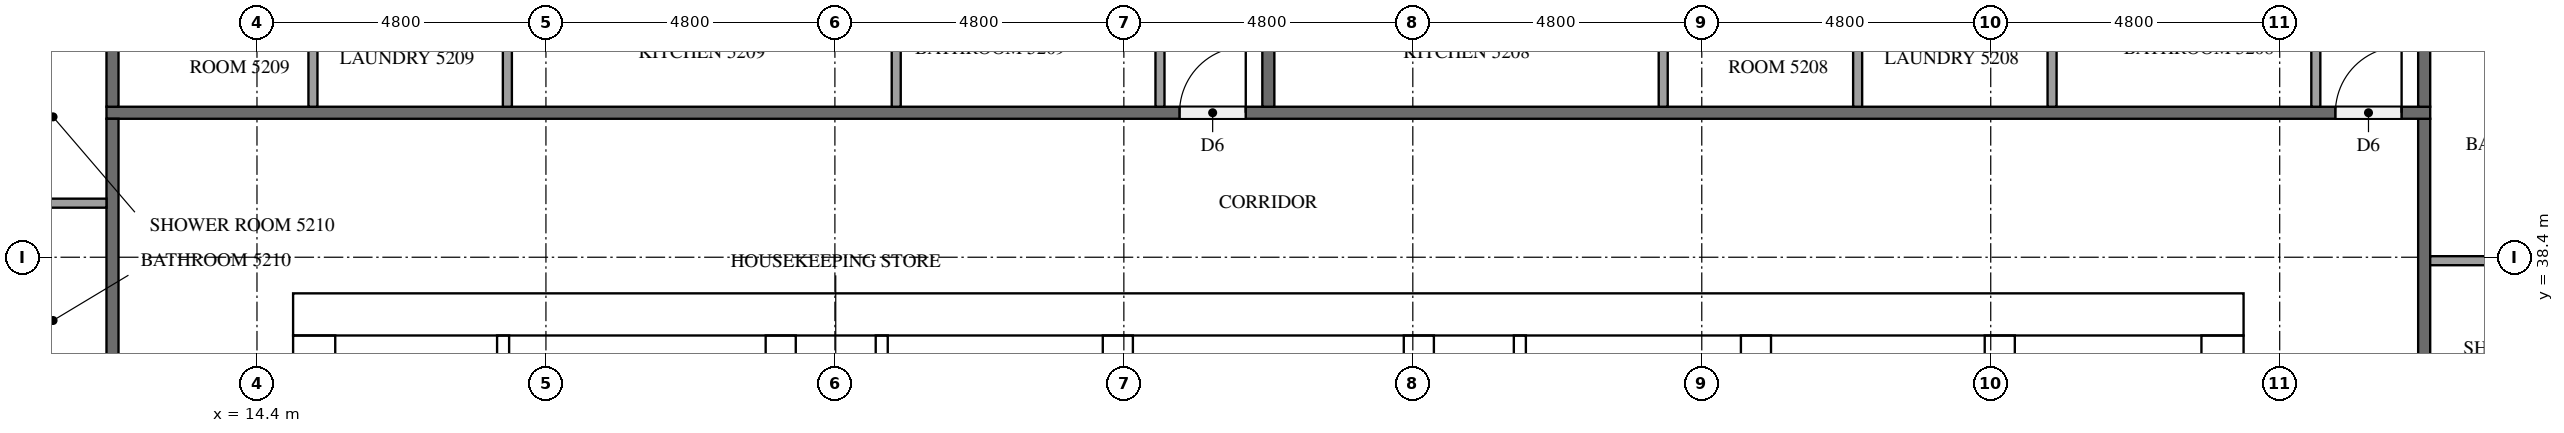
"""IFC4 building model, lengths in metres.
Left out: names, types, materials, properties, quantities, classifications, styles, units other than length and angle.
Written with IfcOpenShell. Run it as: python <this file> out.ifc"""

import sys

from ifc_helpers import new_model, si_unit, direction, frame, frame_2d, origin, place, context, subcontext, project, spatial, rectangle, extrude, element, fill, save


model = new_model("IFC4")
c1 = context("Model", 3, precision=1e-05, world=origin(), true_north=direction((0.0, 1.0)))
c2 = subcontext(c1, "Body", "Model", "MODEL_VIEW")
j1 = project(units=[si_unit("LENGTHUNIT", "METRE"), si_unit("PLANEANGLEUNIT", "RADIAN")], contexts=[c1])
p1 = place(None, origin())
s1 = spatial("IfcSite", under=j1, at=p1, CompositionType="ELEMENT")
p2 = place(p1, origin())
s2 = spatial("IfcBuilding", under=s1, at=p2, CompositionType="ELEMENT")
p3 = place(p2, frame((0.0, 0.0, 199.9)))
s3 = spatial("IfcBuildingStorey", under=s2, at=p3, CompositionType="ELEMENT", Elevation=199.9)
p4 = place(p3, frame((15.0, 37.45, 0.0), z_axis=(0.0, 0.0, 1.0), x_axis=(1.0, 0.0, 0.0)))
e1 = element("IfcWall", 1, at=p4, inside=s3, PredefinedType="SHEAR", context=c2, shape_type="SweptSolid", body=[
    extrude(rectangle(XDim=32.4, YDim=0.7, at=frame_2d((16.2, 0.0))), origin(), (0.0, 0.0, 1.0), 3.1),
])
p5 = place(p4, frame((15.3, 0.0, 0.0)))
e2 = element("IfcOpeningElement", 2, at=p5, cuts=e1, PredefinedType="OPENING", context=c2, shape_type="SweptSolid", body=[
    extrude(rectangle(XDim=1.8, YDim=2.1, at=frame_2d((0.9, 1.05))), frame((0.0, 0.36, 0.0), z_axis=(0.0, -1.0, 0.0), x_axis=(1.0, 0.0, 0.0)), (0.0, 0.0, 1.0), 0.72),
])
p6 = place(p4, frame((1.544, 0.0, 0.0)))
e3 = element("IfcOpeningElement", 3, at=p6, cuts=e1, PredefinedType="OPENING", context=c2, shape_type="SweptSolid", body=[
    extrude(rectangle(XDim=1.0, YDim=2.1, at=frame_2d((0.5, 1.05))), frame((0.0, 0.36, 0.0), z_axis=(0.0, -1.0, 0.0), x_axis=(1.0, 0.0, 0.0)), (0.0, 0.0, 1.0), 0.72),
])
p7 = place(p4, frame((5.219, 0.0, 0.0)))
e4 = element("IfcOpeningElement", 4, at=p7, cuts=e1, PredefinedType="OPENING", context=c2, shape_type="SweptSolid", body=[
    extrude(rectangle(XDim=1.0, YDim=2.1, at=frame_2d((0.5, 1.05))), frame((0.0, 0.36, 0.0), z_axis=(0.0, -1.0, 0.0), x_axis=(1.0, 0.0, 0.0)), (0.0, 0.0, 1.0), 0.72),
])
p8 = place(p3, frame((15.35, 15.7, 0.0), z_axis=(0.0, 0.0, 1.0), x_axis=(0.0, 1.0, 0.0)))
e5 = element("IfcWall", 5, at=p8, inside=s3, PredefinedType="SHEAR", context=c2, shape_type="SweptSolid", body=[
    extrude(rectangle(XDim=21.4, YDim=0.7, at=frame_2d((10.7, 0.0))), origin(), (0.0, 0.0, 1.0), 3.1),
])
p9 = place(p8, frame((5.06, 0.0, 0.0)))
e6 = element("IfcOpeningElement", 6, at=p9, cuts=e5, PredefinedType="OPENING", context=c2, shape_type="SweptSolid", body=[
    extrude(rectangle(XDim=1.2, YDim=2.1, at=frame_2d((0.6, 1.05))), frame((0.0, 0.36, 0.0), z_axis=(0.0, -1.0, 0.0), x_axis=(1.0, 0.0, 0.0)), (0.0, 0.0, 1.0), 0.72),
])
p10 = place(p3, frame((47.05, 15.7, 0.0), z_axis=(0.0, 0.0, 1.0), x_axis=(0.0, 1.0, 0.0)))
e7 = element("IfcWall", 7, at=p10, inside=s3, PredefinedType="SHEAR", context=c2, shape_type="SweptSolid", body=[
    extrude(rectangle(XDim=21.4, YDim=0.7, at=frame_2d((10.7, 0.0))), origin(), (0.0, 0.0, 1.0), 3.1),
])
p11 = place(p10, frame((10.4, 0.0, 0.0)))
e8 = element("IfcOpeningElement", 8, at=p11, cuts=e7, PredefinedType="OPENING", context=c2, shape_type="SweptSolid", body=[
    extrude(rectangle(XDim=1.2, YDim=2.1, at=frame_2d((0.6, 1.05))), frame((0.0, 0.36, 0.0), z_axis=(0.0, -1.0, 0.0), x_axis=(1.0, 0.0, 0.0)), (0.0, 0.0, 1.0), 0.72),
])
p12 = place(p3, frame((23.1, 15.7, 0.0), z_axis=(0.0, 0.0, 1.0), x_axis=(0.0, 1.0, 0.0)))
e9 = element("IfcWall", 9, at=p12, inside=s3, PredefinedType="SHEAR", context=c2, shape_type="SweptSolid", body=[
    extrude(rectangle(XDim=21.4, YDim=0.5, at=frame_2d((10.7, 0.0))), origin(), (0.0, 0.0, 1.0), 3.1),
])
p13 = place(p3, frame((39.3, 27.75, 0.0), z_axis=(0.0, 0.0, 1.0), x_axis=(0.0, 1.0, 0.0)))
e10 = element("IfcWall", 10, at=p13, inside=s3, PredefinedType="SHEAR", context=c2, shape_type="SweptSolid", body=[
    extrude(rectangle(XDim=9.35, YDim=0.5, at=frame_2d((4.675, 0.0))), origin(), (0.0, 0.0, 1.0), 3.1),
])
p14 = place(p3, frame((43.35, 27.75, 0.0), z_axis=(0.0, 0.0, 1.0), x_axis=(0.0, 1.0, 0.0)))
e11 = element("IfcWall", 11, at=p14, inside=s3, PredefinedType="SHEAR", context=c2, shape_type="SweptSolid", body=[
    extrude(rectangle(XDim=9.35, YDim=0.5, at=frame_2d((4.675, 0.0))), origin(), (0.0, 0.0, 1.0), 3.1),
])
p15 = place(p14, frame((7.65, 0.0, 0.0)))
e12 = element("IfcOpeningElement", 12, at=p15, cuts=e11, PredefinedType="OPENING", context=c2, shape_type="SweptSolid", body=[
    extrude(rectangle(XDim=1.2, YDim=2.1, at=frame_2d((0.6, 1.05))), frame((0.0, 0.26, 0.0), z_axis=(0.0, -1.0, 0.0), x_axis=(1.0, 0.0, 0.0)), (0.0, 0.0, 1.0), 0.52),
])
for number, where, z_axis, x_axis in (
    (13, (28.7, 33.8, 0.0), (0.0, 0.0, 1.0), (0.0, 1.0, 0.0)),
    (14, (33.7, 33.8, 0.0), (0.0, 0.0, 1.0), (0.0, 1.0, 0.0)),
):
    element("IfcWall", number, at=place(p3, frame(where, z_axis=z_axis, x_axis=x_axis)), inside=s3, PredefinedType="SHEAR", context=c2, shape_type="SweptSolid", body=[
        extrude(rectangle(XDim=3.3, YDim=0.5, at=frame_2d((1.65, 0.0))), origin(), (0.0, 0.0, 1.0), 3.1),
    ])
p16 = place(p3, frame((18.489, 31.5, 0.0), z_axis=(0.0, 0.0, 1.0), x_axis=(0.0, 1.0, 0.0)))
e15 = element("IfcWall", 15, at=p16, inside=s3, PredefinedType="PARTITIONING", context=c2, shape_type="SweptSolid", body=[
    extrude(rectangle(XDim=5.6, YDim=0.2, at=frame_2d((2.8, 0.0))), origin(), (0.0, 0.0, 1.0), 3.1),
])
for number, where, z_axis, x_axis in (
    (16, (24.778, 33.8, 0.0), (0.0, 0.0, 1.0), (0.0, 1.0, 0.0)),
    (17, (35.378, 33.8, 0.0), (0.0, 0.0, 1.0), (0.0, 1.0, 0.0)),
):
    element("IfcWall", number, at=place(p3, frame(where, z_axis=z_axis, x_axis=x_axis)), inside=s3, PredefinedType="PARTITIONING", context=c2, shape_type="SweptSolid", body=[
        extrude(rectangle(XDim=3.3, YDim=0.2, at=frame_2d((1.65, 0.0))), origin(), (0.0, 0.0, 1.0), 3.1),
    ])
p17 = place(p3, frame((50.4, 40.7, 0.0), z_axis=(0.0, 0.0, 1.0), x_axis=(0.0, -1.0, 0.0)))
e18 = element("IfcWall", 18, at=p17, inside=s3, PredefinedType="PARTITIONING", context=c2, shape_type="SweptSolid", body=[
    extrude(rectangle(XDim=28.6, YDim=0.2, at=frame_2d((14.3, 0.0))), origin(), (0.0, 0.0, 1.0), 3.1),
])
p18 = place(p17, frame((21.875, 0.0, 0.0)))
e19 = element("IfcOpeningElement", 19, at=p18, cuts=e18, PredefinedType="OPENING", context=c2, shape_type="SweptSolid", body=[
    extrude(rectangle(XDim=1.1, YDim=2.1, at=frame_2d((0.55, 1.05))), frame((0.0, 0.11, 0.0), z_axis=(0.0, -1.0, 0.0), x_axis=(1.0, 0.0, 0.0)), (0.0, 0.0, 1.0), 0.22),
])
p19 = place(p17, frame((7.525, 0.0, 0.0)))
e20 = element("IfcOpeningElement", 20, at=p19, cuts=e18, PredefinedType="OPENING", context=c2, shape_type="SweptSolid", body=[
    extrude(rectangle(XDim=1.0, YDim=2.1, at=frame_2d((0.5, 1.05))), frame((0.0, 0.11, 0.0), z_axis=(0.0, -1.0, 0.0), x_axis=(1.0, 0.0, 0.0)), (0.0, 0.0, 1.0), 0.22),
])
p20 = place(p17, frame((5.675, 0.0, 0.0)))
e21 = element("IfcOpeningElement", 21, at=p20, cuts=e18, PredefinedType="OPENING", context=c2, shape_type="SweptSolid", body=[
    extrude(rectangle(XDim=1.0, YDim=2.1, at=frame_2d((0.5, 1.05))), frame((0.0, 0.11, 0.0), z_axis=(0.0, -1.0, 0.0), x_axis=(1.0, 0.0, 0.0)), (0.0, 0.0, 1.0), 0.22),
])
p21 = place(p3, frame((11.9, 40.8, 0.0), z_axis=(0.0, 0.0, 1.0), x_axis=(1.0, 0.0, 0.0)))
e22 = element("IfcWall", 22, at=p21, inside=s3, PredefinedType="PARTITIONING", context=c2, shape_type="SweptSolid", body=[
    extrude(rectangle(XDim=38.6, YDim=0.2, at=frame_2d((19.3, 0.0))), origin(), (0.0, 0.0, 1.0), 3.1),
])
p22 = place(p21, frame((37.025, 0.0, 0.0)))
e23 = element("IfcOpeningElement", 23, at=p22, cuts=e22, PredefinedType="OPENING", context=c2, shape_type="SweptSolid", body=[
    extrude(rectangle(XDim=1.1, YDim=2.1, at=frame_2d((0.55, 1.05))), frame((0.0, 0.11, 0.0), z_axis=(0.0, -1.0, 0.0), x_axis=(1.0, 0.0, 0.0)), (0.0, 0.0, 1.0), 0.22),
])
p23 = place(p21, frame((17.825, 0.0, 0.0)))
e24 = element("IfcOpeningElement", 24, at=p23, cuts=e22, PredefinedType="OPENING", context=c2, shape_type="SweptSolid", body=[
    extrude(rectangle(XDim=1.1, YDim=2.1, at=frame_2d((0.55, 1.05))), frame((0.0, 0.11, 0.0), z_axis=(0.0, -1.0, 0.0), x_axis=(1.0, 0.0, 0.0)), (0.0, 0.0, 1.0), 0.22),
])
p24 = place(p3, frame((12.0, 12.1, 0.0), z_axis=(0.0, 0.0, 1.0), x_axis=(0.0, 1.0, 0.0)))
e25 = element("IfcWall", 25, at=p24, inside=s3, PredefinedType="PARTITIONING", context=c2, shape_type="SweptSolid", body=[
    extrude(rectangle(XDim=28.6, YDim=0.2, at=frame_2d((14.3, 0.0))), origin(), (0.0, 0.0, 1.0), 3.1),
])
p25 = place(p24, frame((21.925, 0.0, 0.0)))
e26 = element("IfcOpeningElement", 26, at=p25, cuts=e25, PredefinedType="OPENING", context=c2, shape_type="SweptSolid", body=[
    extrude(rectangle(XDim=1.0, YDim=2.1, at=frame_2d((0.5, 1.05))), frame((0.0, 0.11, 0.0), z_axis=(0.0, -1.0, 0.0), x_axis=(1.0, 0.0, 0.0)), (0.0, 0.0, 1.0), 0.22),
])
p26 = place(p24, frame((14.725, 0.0, 0.0)))
e27 = element("IfcOpeningElement", 27, at=p26, cuts=e25, PredefinedType="OPENING", context=c2, shape_type="SweptSolid", body=[
    extrude(rectangle(XDim=1.0, YDim=2.1, at=frame_2d((0.5, 1.05))), frame((0.0, 0.11, 0.0), z_axis=(0.0, -1.0, 0.0), x_axis=(1.0, 0.0, 0.0)), (0.0, 0.0, 1.0), 0.22),
])
p27 = place(p24, frame((12.875, 0.0, 0.0)))
e28 = element("IfcOpeningElement", 28, at=p27, cuts=e25, PredefinedType="OPENING", context=c2, shape_type="SweptSolid", body=[
    extrude(rectangle(XDim=1.0, YDim=2.1, at=frame_2d((0.5, 1.05))), frame((0.0, 0.11, 0.0), z_axis=(0.0, -1.0, 0.0), x_axis=(1.0, 0.0, 0.0)), (0.0, 0.0, 1.0), 0.22),
])
for number, where, z_axis, x_axis in (
    (29, (50.4, 40.9, 0.0), (0.0, 0.0, 1.0), (0.0, 1.0, 0.0)),
    (30, (31.2, 47.9, 0.0), (0.0, 0.0, 1.0), (0.0, -1.0, 0.0)),
    (31, (12.0, 47.9, 0.0), (0.0, 0.0, 1.0), (0.0, -1.0, 0.0)),
):
    element("IfcWall", number, at=place(p3, frame(where, z_axis=z_axis, x_axis=x_axis)), inside=s3, PredefinedType="PARTITIONING", context=c2, shape_type="SweptSolid", body=[
        extrude(rectangle(XDim=7.0, YDim=0.2, at=frame_2d((3.5, 0.0))), origin(), (0.0, 0.0, 1.0), 3.1),
    ])
p28 = place(p3, frame((50.5, 38.342, 0.0), z_axis=(0.0, 0.0, 1.0), x_axis=(1.0, 0.0, 0.0)))
e32 = element("IfcWall", 32, at=p28, inside=s3, PredefinedType="PARTITIONING", context=c2, shape_type="SweptSolid", body=[
    extrude(rectangle(XDim=4.175, YDim=0.15, at=frame_2d((2.087, 0.0))), origin(), (0.0, 0.0, 1.0), 3.1),
])
for number, where, z_axis, x_axis in (
    (33, (44.219, 40.9, 0.0), (0.0, 0.0, 1.0), (0.0, 1.0, 0.0)),
    (34, (40.989, 40.9, 0.0), (0.0, 0.0, 1.0), (0.0, 1.0, 0.0)),
    (35, (37.76, 40.9, 0.0), (0.0, 0.0, 1.0), (0.0, 1.0, 0.0)),
):
    element("IfcWall", number, at=place(p3, frame(where, z_axis=z_axis, x_axis=x_axis)), inside=s3, PredefinedType="PARTITIONING", context=c2, shape_type="SweptSolid", body=[
        extrude(rectangle(XDim=1.775, YDim=0.15, at=frame_2d((0.888, 0.0))), origin(), (0.0, 0.0, 1.0), 3.1),
    ])
p29 = place(p3, frame((48.6, 40.9, 0.0), z_axis=(0.0, 0.0, 1.0), x_axis=(0.0, 1.0, 0.0)))
e36 = element("IfcWall", 36, at=p29, inside=s3, PredefinedType="PARTITIONING", context=c2, shape_type="SweptSolid", body=[
    extrude(rectangle(XDim=1.925, YDim=0.15, at=frame_2d((0.962, 0.0))), origin(), (0.0, 0.0, 1.0), 3.1),
])
for number, where, z_axis, x_axis in (
    (37, (25.019, 40.9, 0.0), (0.0, 0.0, 1.0), (0.0, 1.0, 0.0)),
    (38, (18.559, 40.9, 0.0), (0.0, 0.0, 1.0), (0.0, 1.0, 0.0)),
    (39, (15.33, 40.9, 0.0), (0.0, 0.0, 1.0), (0.0, 1.0, 0.0)),
):
    element("IfcWall", number, at=place(p3, frame(where, z_axis=z_axis, x_axis=x_axis)), inside=s3, PredefinedType="PARTITIONING", context=c2, shape_type="SweptSolid", body=[
        extrude(rectangle(XDim=1.775, YDim=0.15, at=frame_2d((0.888, 0.0))), origin(), (0.0, 0.0, 1.0), 3.1),
    ])
p30 = place(p3, frame((29.4, 40.9, 0.0), z_axis=(0.0, 0.0, 1.0), x_axis=(0.0, 1.0, 0.0)))
e40 = element("IfcWall", 40, at=p30, inside=s3, PredefinedType="PARTITIONING", context=c2, shape_type="SweptSolid", body=[
    extrude(rectangle(XDim=1.925, YDim=0.15, at=frame_2d((0.962, 0.0))), origin(), (0.0, 0.0, 1.0), 3.1),
])
p31 = place(p3, frame((11.9, 39.298, 0.0), z_axis=(0.0, 0.0, 1.0), x_axis=(-1.0, 0.0, 0.0)))
e41 = element("IfcWall", 41, at=p31, inside=s3, PredefinedType="PARTITIONING", context=c2, shape_type="SweptSolid", body=[
    extrude(rectangle(XDim=1.775, YDim=0.15, at=frame_2d((0.887, 0.0))), origin(), (0.0, 0.0, 1.0), 3.1),
])
p32 = place(p5, origin())
e42 = element("IfcDoor", 42, at=p32, inside=s3, OperationType="DOUBLE_DOOR_SINGLE_SWING", PredefinedType="DOOR", context=c2, shape_type="SweptSolid", body=[
    extrude(rectangle(XDim=1.8, YDim=2.1, at=frame_2d((0.9, 1.05))), frame((0.0, 0.025, 0.0), z_axis=(0.0, -1.0, 0.0), x_axis=(1.0, 0.0, 0.0)), (0.0, 0.0, 1.0), 0.05),
])
fill(e2, e42)
p33 = place(p6, origin())
e43 = element("IfcDoor", 43, at=p33, inside=s3, OperationType="SINGLE_SWING_LEFT", PredefinedType="DOOR", context=c2, shape_type="SweptSolid", body=[
    extrude(rectangle(XDim=1.0, YDim=2.1, at=frame_2d((0.5, 1.05))), frame((0.0, 0.025, 0.0), z_axis=(0.0, -1.0, 0.0), x_axis=(1.0, 0.0, 0.0)), (0.0, 0.0, 1.0), 0.05),
])
fill(e3, e43)
p34 = place(p7, origin())
e44 = element("IfcDoor", 44, at=p34, inside=s3, OperationType="SINGLE_SWING_RIGHT", PredefinedType="DOOR", context=c2, shape_type="SweptSolid", body=[
    extrude(rectangle(XDim=1.0, YDim=2.1, at=frame_2d((0.5, 1.05))), frame((0.0, 0.025, 0.0), z_axis=(0.0, -1.0, 0.0), x_axis=(1.0, 0.0, 0.0)), (0.0, 0.0, 1.0), 0.05),
])
fill(e4, e44)
p35 = place(p22, origin())
e45 = element("IfcDoor", 45, at=p35, inside=s3, OperationType="SINGLE_SWING_RIGHT", PredefinedType="DOOR", context=c2, shape_type="SweptSolid", body=[
    extrude(rectangle(XDim=1.1, YDim=2.1, at=frame_2d((0.55, 1.05))), frame((0.0, 0.025, 0.0), z_axis=(0.0, -1.0, 0.0), x_axis=(1.0, 0.0, 0.0)), (0.0, 0.0, 1.0), 0.05),
])
fill(e23, e45)
p36 = place(p23, origin())
e46 = element("IfcDoor", 46, at=p36, inside=s3, OperationType="SINGLE_SWING_RIGHT", PredefinedType="DOOR", context=c2, shape_type="SweptSolid", body=[
    extrude(rectangle(XDim=1.1, YDim=2.1, at=frame_2d((0.55, 1.05))), frame((0.0, 0.025, 0.0), z_axis=(0.0, -1.0, 0.0), x_axis=(1.0, 0.0, 0.0)), (0.0, 0.0, 1.0), 0.05),
])
fill(e24, e46)
save(model, sys.argv[1])
